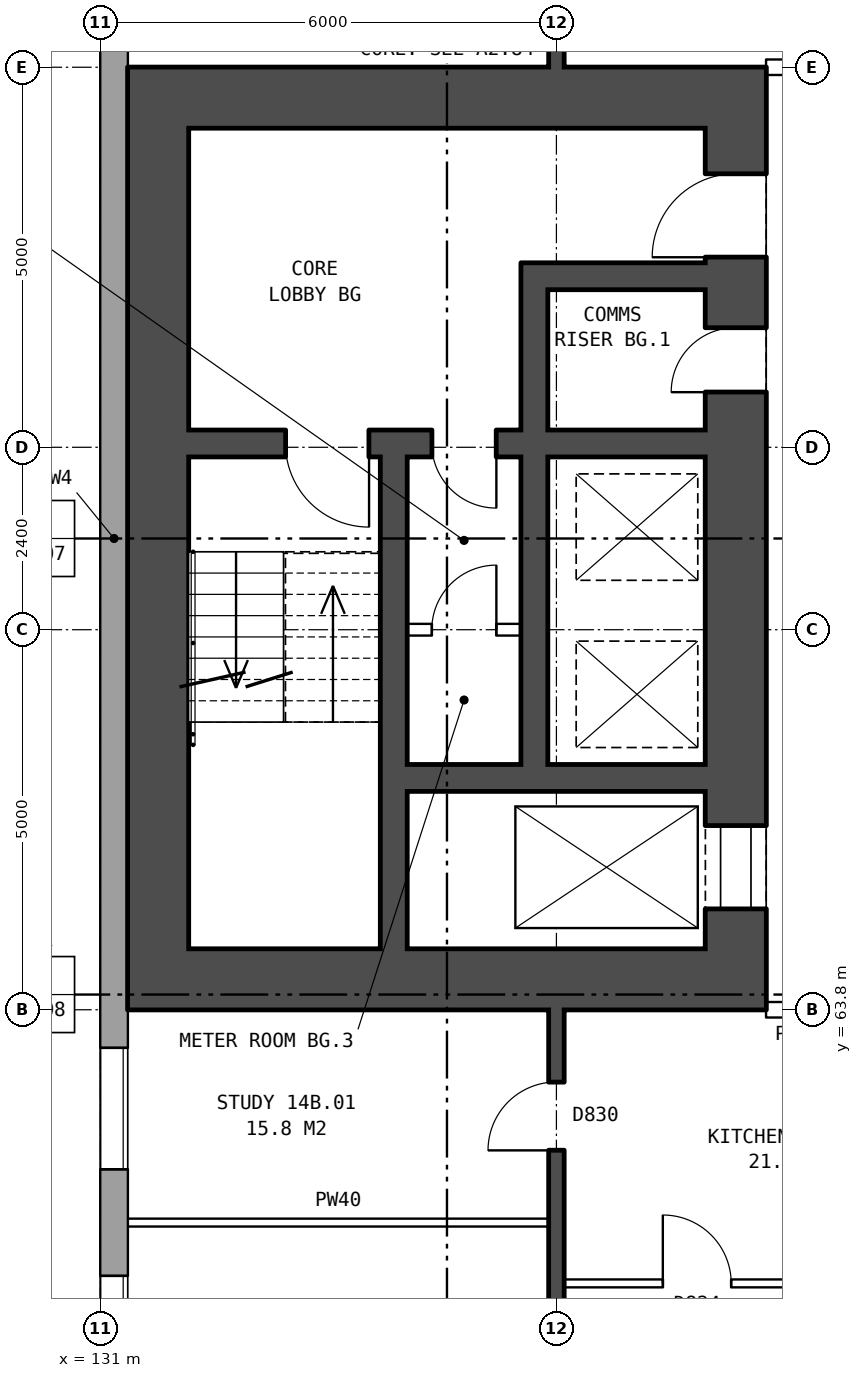
"""IFC4 building model, lengths in metres.
Left out: names, types, materials, properties, quantities, classifications, styles, units other than length and angle.
Written with IfcOpenShell. Run it as: python <this file> out.ifc"""

import sys

from ifc_helpers import new_model, si_unit, direction, frame, frame_2d, origin, place, context, subcontext, project, spatial, rectangle, extrude, element, fill, save


model = new_model("IFC4")
c1 = context("Model", 3, precision=1e-05, world=origin(), true_north=direction((0.0, 1.0)))
c2 = subcontext(c1, "Body", "Model", "MODEL_VIEW")
j1 = project(units=[si_unit("LENGTHUNIT", "METRE"), si_unit("PLANEANGLEUNIT", "RADIAN")], contexts=[c1])
p1 = place(None, origin())
s1 = spatial("IfcSite", under=j1, at=p1, CompositionType="ELEMENT")
p2 = place(p1, origin())
s2 = spatial("IfcBuilding", under=s1, at=p2, CompositionType="ELEMENT")
p3 = place(p2, frame((0.0, 0.0, 53.6)))
s3 = spatial("IfcBuildingStorey", under=s2, at=p3, CompositionType="ELEMENT", Elevation=53.6)
p4 = place(p3, frame((131.18, 82.925, 0.0), z_axis=(0.0, 0.0, 1.0), x_axis=(0.0, -1.0, 0.0)))
e1 = element("IfcWall", 1, at=p4, inside=s3, PredefinedType="STANDARD", context=c2, shape_type="SweptSolid", body=[
    extrude(rectangle(XDim=25.851, YDim=0.36, at=frame_2d((12.925, 0.0))), origin(), (0.0, 0.0, 1.0), 2.85),
])
p5 = place(p4, frame((1.625, 0.0, 0.8)))
e2 = element("IfcOpeningElement", 2, at=p5, cuts=e1, PredefinedType="OPENING", context=c2, shape_type="SweptSolid", body=[
    extrude(rectangle(XDim=1.6, YDim=1.8, at=frame_2d((0.8, 0.9))), frame((0.0, 0.19, 0.0), z_axis=(0.0, -1.0, 0.0), x_axis=(1.0, 0.0, 0.0)), (0.0, 0.0, 1.0), 0.38),
])
p6 = place(p4, frame((4.625, 0.0, 0.8)))
e3 = element("IfcOpeningElement", 3, at=p6, cuts=e1, PredefinedType="OPENING", context=c2, shape_type="SweptSolid", body=[
    extrude(rectangle(XDim=1.6, YDim=1.8, at=frame_2d((0.8, 0.9))), frame((0.0, 0.19, 0.0), z_axis=(0.0, -1.0, 0.0), x_axis=(1.0, 0.0, 0.0)), (0.0, 0.0, 1.0), 0.38),
])
p7 = place(p4, frame((19.625, 0.0, 0.8)))
e4 = element("IfcOpeningElement", 4, at=p7, cuts=e1, PredefinedType="OPENING", context=c2, shape_type="SweptSolid", body=[
    extrude(rectangle(XDim=1.6, YDim=1.8, at=frame_2d((0.8, 0.9))), frame((0.0, 0.19, 0.0), z_axis=(0.0, -1.0, 0.0), x_axis=(1.0, 0.0, 0.0)), (0.0, 0.0, 1.0), 0.38),
])
p8 = place(p4, frame((22.625, 0.0, 0.8)))
e5 = element("IfcOpeningElement", 5, at=p8, cuts=e1, PredefinedType="OPENING", context=c2, shape_type="SweptSolid", body=[
    extrude(rectangle(XDim=1.6, YDim=1.8, at=frame_2d((0.8, 0.9))), frame((0.0, 0.19, 0.0), z_axis=(0.0, -1.0, 0.0), x_axis=(1.0, 0.0, 0.0)), (0.0, 0.0, 1.0), 0.38),
])
p9 = place(p3, frame((139.36, 64.6, 0.0), z_axis=(0.0, 0.0, 1.0), x_axis=(0.0, 1.0, 0.0)))
e6 = element("IfcWall", 6, at=p9, inside=s3, PredefinedType="SHEAR", context=c2, shape_type="SweptSolid", body=[
    extrude(rectangle(XDim=10.8, YDim=0.8, at=frame_2d((5.4, 0.0))), origin(), (0.0, 0.0, 1.0), 2.85),
])
p10 = place(p9, frame((0.525, 0.0, 0.0)))
e7 = element("IfcOpeningElement", 7, at=p10, cuts=e6, PredefinedType="OPENING", context=c2, shape_type="SweptSolid", body=[
    extrude(rectangle(XDim=1.1, YDim=2.1, at=frame_2d((0.55, 1.05))), frame((0.0, 0.41, 0.0), z_axis=(0.0, -1.0, 0.0), x_axis=(1.0, 0.0, 0.0)), (0.0, 0.0, 1.0), 0.82),
])
p11 = place(p9, frame((9.1, 0.0, 0.0)))
e8 = element("IfcOpeningElement", 8, at=p11, cuts=e6, PredefinedType="OPENING", context=c2, shape_type="SweptSolid", body=[
    extrude(rectangle(XDim=1.1, YDim=2.1, at=frame_2d((0.55, 1.05))), frame((0.0, 0.41, 0.0), z_axis=(0.0, -1.0, 0.0), x_axis=(1.0, 0.0, 0.0)), (0.0, 0.0, 1.0), 0.82),
])
p12 = place(p9, frame((7.325, 0.0, 0.0)))
e9 = element("IfcOpeningElement", 9, at=p12, cuts=e6, PredefinedType="OPENING", context=c2, shape_type="SweptSolid", body=[
    extrude(rectangle(XDim=0.85, YDim=2.1, at=frame_2d((0.425, 1.05))), frame((0.0, 0.41, 0.0), z_axis=(0.0, -1.0, 0.0), x_axis=(1.0, 0.0, 0.0)), (0.0, 0.0, 1.0), 0.82),
])
p13 = place(p3, frame((131.76, 64.6, 0.0), z_axis=(0.0, 0.0, 1.0), x_axis=(0.0, 1.0, 0.0)))
e10 = element("IfcWall", 10, at=p13, inside=s3, PredefinedType="SHEAR", context=c2, shape_type="SweptSolid", body=[
    extrude(rectangle(XDim=10.8, YDim=0.8, at=frame_2d((5.4, 0.0))), origin(), (0.0, 0.0, 1.0), 2.85),
])
for number, where, z_axis, x_axis in (
    (11, (139.76, 64.2, 0.0), (0.0, 0.0, 1.0), (-1.0, 0.0, 0.0)),
    (12, (139.76, 75.8, 0.0), (0.0, 0.0, 1.0), (-1.0, 0.0, 0.0)),
):
    element("IfcWall", number, at=place(p3, frame(where, z_axis=z_axis, x_axis=x_axis)), inside=s3, PredefinedType="SHEAR", context=c2, shape_type="SweptSolid", body=[
        extrude(rectangle(XDim=8.4, YDim=0.8, at=frame_2d((4.2, 0.0))), origin(), (0.0, 0.0, 1.0), 2.85),
    ])
p14 = place(p3, frame((138.96, 66.85, 0.0), z_axis=(0.0, 0.0, 1.0), x_axis=(-1.0, 0.0, 0.0)))
e13 = element("IfcWall", 13, at=p14, inside=s3, PredefinedType="SHEAR", context=c2, shape_type="SweptSolid", body=[
    extrude(rectangle(XDim=3.925, YDim=0.35, at=frame_2d((1.962, 0.0))), origin(), (0.0, 0.0, 1.0), 2.85),
])
p15 = place(p3, frame((136.535, 68.8, 0.0), z_axis=(0.0, 0.0, 1.0), x_axis=(-1.0, 0.0, 0.0)))
e14 = element("IfcWall", 14, at=p15, inside=s3, PredefinedType="PARTITIONING", context=c2, shape_type="SweptSolid", body=[
    extrude(rectangle(XDim=1.5, YDim=0.15, at=frame_2d((0.75, 0.0))), origin(), (0.0, 0.0, 1.0), 2.85),
])
p16 = place(p15, frame((0.325, 0.0, 0.0)))
e15 = element("IfcOpeningElement", 15, at=p16, cuts=e14, PredefinedType="OPENING", context=c2, shape_type="SweptSolid", body=[
    extrude(rectangle(XDim=0.85, YDim=2.1, at=frame_2d((0.425, 1.05))), frame((0.0, 0.085, 0.0), z_axis=(0.0, -1.0, 0.0), x_axis=(1.0, 0.0, 0.0)), (0.0, 0.0, 1.0), 0.17),
])
p17 = place(p3, frame((138.96, 71.25, 0.0), z_axis=(0.0, 0.0, 1.0), x_axis=(-1.0, 0.0, 0.0)))
e16 = element("IfcWall", 16, at=p17, inside=s3, PredefinedType="SHEAR", context=c2, shape_type="SweptSolid", body=[
    extrude(rectangle(XDim=6.8, YDim=0.35, at=frame_2d((3.4, 0.0))), origin(), (0.0, 0.0, 1.0), 2.85),
])
p18 = place(p17, frame((4.425, 0.0, 0.0)))
e17 = element("IfcOpeningElement", 17, at=p18, cuts=e16, PredefinedType="OPENING", context=c2, shape_type="SweptSolid", body=[
    extrude(rectangle(XDim=1.1, YDim=2.1, at=frame_2d((0.55, 1.05))), frame((0.0, 0.185, 0.0), z_axis=(0.0, -1.0, 0.0), x_axis=(1.0, 0.0, 0.0)), (0.0, 0.0, 1.0), 0.37),
])
p19 = place(p17, frame((2.75, 0.0, 0.0)))
e18 = element("IfcOpeningElement", 18, at=p19, cuts=e16, PredefinedType="OPENING", context=c2, shape_type="SweptSolid", body=[
    extrude(rectangle(XDim=0.85, YDim=2.1, at=frame_2d((0.425, 1.05))), frame((0.0, 0.185, 0.0), z_axis=(0.0, -1.0, 0.0), x_axis=(1.0, 0.0, 0.0)), (0.0, 0.0, 1.0), 0.37),
])
p20 = place(p3, frame((138.96, 73.45, 0.0), z_axis=(0.0, 0.0, 1.0), x_axis=(-1.0, 0.0, 0.0)))
e19 = element("IfcWall", 19, at=p20, inside=s3, PredefinedType="SHEAR", context=c2, shape_type="SweptSolid", body=[
    extrude(rectangle(XDim=2.075, YDim=0.35, at=frame_2d((1.038, 0.0))), origin(), (0.0, 0.0, 1.0), 2.85),
])
p21 = place(p3, frame((136.71, 67.025, 0.0), z_axis=(0.0, 0.0, 1.0), x_axis=(0.0, 1.0, 0.0)))
e20 = element("IfcWall", 20, at=p21, inside=s3, PredefinedType="SHEAR", context=c2, shape_type="SweptSolid", body=[
    extrude(rectangle(XDim=4.05, YDim=0.35, at=frame_2d((2.025, 0.0))), origin(), (0.0, 0.0, 1.0), 2.85),
])
p22 = place(p3, frame((136.71, 71.425, 0.0), z_axis=(0.0, 0.0, 1.0), x_axis=(0.0, 1.0, 0.0)))
e21 = element("IfcWall", 21, at=p22, inside=s3, PredefinedType="SHEAR", context=c2, shape_type="SweptSolid", body=[
    extrude(rectangle(XDim=2.2, YDim=0.35, at=frame_2d((1.1, 0.0))), origin(), (0.0, 0.0, 1.0), 2.85),
])
p23 = place(p3, frame((134.86, 64.6, 0.0), z_axis=(0.0, 0.0, 1.0), x_axis=(0.0, 1.0, 0.0)))
e22 = element("IfcWall", 22, at=p23, inside=s3, PredefinedType="SHEAR", context=c2, shape_type="SweptSolid", body=[
    extrude(rectangle(XDim=6.475, YDim=0.35, at=frame_2d((3.237, 0.0))), origin(), (0.0, 0.0, 1.0), 2.85),
])
p24 = place(p3, frame((137.1, 60.2, 0.0), z_axis=(0.0, 0.0, 1.0), x_axis=(1.0, 0.0, 0.0)))
e23 = element("IfcWall", 23, at=p24, inside=s3, PredefinedType="PARTITIONING", context=c2, shape_type="SweptSolid", body=[
    extrude(rectangle(XDim=5.8, YDim=0.1, at=frame_2d((2.9, 0.0))), origin(), (0.0, 0.0, 1.0), 2.85),
])
p25 = place(p24, frame((1.3, 0.0, 0.0)))
e24 = element("IfcOpeningElement", 24, at=p25, cuts=e23, PredefinedType="OPENING", context=c2, shape_type="SweptSolid", body=[
    extrude(rectangle(XDim=0.9, YDim=2.1, at=frame_2d((0.45, 1.05))), frame((0.0, 0.06, 0.0), z_axis=(0.0, -1.0, 0.0), x_axis=(1.0, 0.0, 0.0)), (0.0, 0.0, 1.0), 0.12),
])
p26 = place(p24, frame((4.2, 0.0, 0.0)))
e25 = element("IfcOpeningElement", 25, at=p26, cuts=e23, PredefinedType="OPENING", context=c2, shape_type="SweptSolid", body=[
    extrude(rectangle(XDim=0.9, YDim=2.1, at=frame_2d((0.45, 1.05))), frame((0.0, 0.06, 0.0), z_axis=(0.0, -1.0, 0.0), x_axis=(1.0, 0.0, 0.0)), (0.0, 0.0, 1.0), 0.12),
])
p27 = place(p3, frame((131.36, 61.0, 0.0), z_axis=(0.0, 0.0, 1.0), x_axis=(1.0, 0.0, 0.0)))
e26 = element("IfcWall", 26, at=p27, inside=s3, PredefinedType="PARTITIONING", context=c2, shape_type="SweptSolid", body=[
    extrude(rectangle(XDim=5.54, YDim=0.1, at=frame_2d((2.77, 0.0))), origin(), (0.0, 0.0, 1.0), 2.85),
])
p28 = place(p3, frame((139.76, 63.8, 0.0), z_axis=(0.0, 0.0, 1.0), x_axis=(1.0, 0.0, 0.0)))
e27 = element("IfcWall", 27, at=p28, inside=s3, PredefinedType="PARTITIONING", context=c2, shape_type="SweptSolid", body=[
    extrude(rectangle(XDim=3.0, YDim=0.2, at=frame_2d((1.5, 0.0))), origin(), (0.0, 0.0, 1.0), 2.85),
])
p29 = place(p28, frame((1.0, 0.0, 0.0)))
e28 = element("IfcOpeningElement", 28, at=p29, cuts=e27, PredefinedType="OPENING", context=c2, shape_type="SweptSolid", body=[
    extrude(rectangle(XDim=1.0, YDim=2.1, at=frame_2d((0.5, 1.05))), frame((0.0, 0.11, 0.0), z_axis=(0.0, -1.0, 0.0), x_axis=(1.0, 0.0, 0.0)), (0.0, 0.0, 1.0), 0.22),
])
p30 = place(p3, frame((139.76, 76.2, 0.0), z_axis=(0.0, 0.0, 1.0), x_axis=(1.0, 0.0, 0.0)))
e29 = element("IfcWall", 29, at=p30, inside=s3, PredefinedType="PARTITIONING", context=c2, shape_type="SweptSolid", body=[
    extrude(rectangle(XDim=3.0, YDim=0.2, at=frame_2d((1.5, 0.0))), origin(), (0.0, 0.0, 1.0), 2.85),
])
p31 = place(p30, frame((1.0, 0.0, 0.0)))
e30 = element("IfcOpeningElement", 30, at=p31, cuts=e29, PredefinedType="OPENING", context=c2, shape_type="SweptSolid", body=[
    extrude(rectangle(XDim=1.0, YDim=2.1, at=frame_2d((0.5, 1.05))), frame((0.0, 0.11, 0.0), z_axis=(0.0, -1.0, 0.0), x_axis=(1.0, 0.0, 0.0)), (0.0, 0.0, 1.0), 0.22),
])
p32 = place(p3, frame((137.0, 54.36, 0.0), z_axis=(0.0, 0.0, 1.0), x_axis=(0.0, 1.0, 0.0)))
e31 = element("IfcWall", 31, at=p32, inside=s3, PredefinedType="SOLIDWALL", context=c2, shape_type="SweptSolid", body=[
    extrude(rectangle(XDim=9.44, YDim=0.2, at=frame_2d((4.72, 0.0))), origin(), (0.0, 0.0, 1.0), 2.85),
])
p33 = place(p32, frame((2.47, 0.0, 0.0)))
e32 = element("IfcOpeningElement", 32, at=p33, cuts=e31, PredefinedType="OPENING", context=c2, shape_type="SweptSolid", body=[
    extrude(rectangle(XDim=0.9, YDim=2.1, at=frame_2d((0.45, 1.05))), frame((0.0, 0.11, 0.0), z_axis=(0.0, -1.0, 0.0), x_axis=(1.0, 0.0, 0.0)), (0.0, 0.0, 1.0), 0.22),
])
p34 = place(p32, frame((7.59, 0.0, 0.0)))
e33 = element("IfcOpeningElement", 33, at=p34, cuts=e31, PredefinedType="OPENING", context=c2, shape_type="SweptSolid", body=[
    extrude(rectangle(XDim=0.9, YDim=2.1, at=frame_2d((0.45, 1.05))), frame((0.0, 0.11, 0.0), z_axis=(0.0, -1.0, 0.0), x_axis=(1.0, 0.0, 0.0)), (0.0, 0.0, 1.0), 0.22),
])
p35 = place(p3, frame((137.0, 76.2, 0.0), z_axis=(0.0, 0.0, 1.0), x_axis=(0.0, 1.0, 0.0)))
e34 = element("IfcWall", 34, at=p35, inside=s3, PredefinedType="SOLIDWALL", context=c2, shape_type="SweptSolid", body=[
    extrude(rectangle(XDim=9.44, YDim=0.2, at=frame_2d((4.72, 0.0))), origin(), (0.0, 0.0, 1.0), 2.85),
])
p36 = place(p35, frame((1.5, 0.0, 0.0)))
e35 = element("IfcOpeningElement", 35, at=p36, cuts=e34, PredefinedType="OPENING", context=c2, shape_type="SweptSolid", body=[
    extrude(rectangle(XDim=0.9, YDim=2.1, at=frame_2d((0.45, 1.05))), frame((0.0, 0.11, 0.0), z_axis=(0.0, -1.0, 0.0), x_axis=(1.0, 0.0, 0.0)), (0.0, 0.0, 1.0), 0.22),
])
p37 = place(p7, origin())
e36 = element("IfcWindow", 36, at=p37, inside=s3, PartitioningType="SINGLE_PANEL", PredefinedType="WINDOW", context=c2, shape_type="SweptSolid", body=[
    extrude(rectangle(XDim=1.6, YDim=1.8, at=frame_2d((0.8, 0.9))), frame((0.0, 0.15, 0.0), z_axis=(0.0, -1.0, 0.0), x_axis=(1.0, 0.0, 0.0)), (0.0, 0.0, 1.0), 0.06),
])
fill(e4, e36)
p38 = place(p8, origin())
e37 = element("IfcWindow", 37, at=p38, inside=s3, PartitioningType="SINGLE_PANEL", PredefinedType="WINDOW", context=c2, shape_type="SweptSolid", body=[
    extrude(rectangle(XDim=1.6, YDim=1.8, at=frame_2d((0.8, 0.9))), frame((0.0, 0.15, 0.0), z_axis=(0.0, -1.0, 0.0), x_axis=(1.0, 0.0, 0.0)), (0.0, 0.0, 1.0), 0.06),
])
fill(e5, e37)
p39 = place(p10, origin())
e38 = element("IfcDoor", 38, at=p39, inside=s3, OperationType="DOUBLE_DOOR_SLIDING", PredefinedType="DOOR", context=c2, shape_type="SweptSolid", body=[
    extrude(rectangle(XDim=1.1, YDim=2.1, at=frame_2d((0.55, 1.05))), frame((0.0, 0.385, 0.0), z_axis=(0.0, -1.0, 0.0), x_axis=(1.0, 0.0, 0.0)), (0.0, 0.0, 1.0), 0.05),
])
fill(e7, e38)
p40 = place(p11, origin())
e39 = element("IfcDoor", 39, at=p40, inside=s3, OperationType="SINGLE_SWING_LEFT", PredefinedType="DOOR", context=c2, shape_type="SweptSolid", body=[
    extrude(rectangle(XDim=1.1, YDim=2.1, at=frame_2d((0.55, 1.05))), frame((0.0, 0.385, 0.0), z_axis=(0.0, -1.0, 0.0), x_axis=(1.0, 0.0, 0.0)), (0.0, 0.0, 1.0), 0.05),
])
fill(e8, e39)
p41 = place(p18, origin())
e40 = element("IfcDoor", 40, at=p41, inside=s3, OperationType="SINGLE_SWING_LEFT", PredefinedType="DOOR", context=c2, shape_type="SweptSolid", body=[
    extrude(rectangle(XDim=1.1, YDim=2.1, at=frame_2d((0.55, 1.05))), frame((0.0, 0.025, 0.0), z_axis=(0.0, -1.0, 0.0), x_axis=(1.0, 0.0, 0.0)), (0.0, 0.0, 1.0), 0.05),
])
fill(e17, e40)
p42 = place(p12, origin())
e41 = element("IfcDoor", 41, at=p42, inside=s3, OperationType="SINGLE_SWING_LEFT", PredefinedType="DOOR", context=c2, shape_type="SweptSolid", body=[
    extrude(rectangle(XDim=0.85, YDim=2.1, at=frame_2d((0.425, 1.05))), frame((0.0, 0.385, 0.0), z_axis=(0.0, -1.0, 0.0), x_axis=(1.0, 0.0, 0.0)), (0.0, 0.0, 1.0), 0.05),
])
fill(e9, e41)
p43 = place(p19, origin())
e42 = element("IfcDoor", 42, at=p43, inside=s3, OperationType="SINGLE_SWING_LEFT", PredefinedType="DOOR", context=c2, shape_type="SweptSolid", body=[
    extrude(rectangle(XDim=0.85, YDim=2.1, at=frame_2d((0.425, 1.05))), frame((0.0, 0.025, 0.0), z_axis=(0.0, -1.0, 0.0), x_axis=(1.0, 0.0, 0.0)), (0.0, 0.0, 1.0), 0.05),
])
fill(e18, e42)
p44 = place(p16, frame((0.85, 0.0, 0.0), z_axis=(0.0, 0.0, 1.0), x_axis=(-1.0, 0.0, 0.0)))
e43 = element("IfcDoor", 43, at=p44, inside=s3, OperationType="SINGLE_SWING_RIGHT", PredefinedType="DOOR", context=c2, shape_type="SweptSolid", body=[
    extrude(rectangle(XDim=0.85, YDim=2.1, at=frame_2d((0.425, 1.05))), frame((0.0, 0.025, 0.0), z_axis=(0.0, -1.0, 0.0), x_axis=(1.0, 0.0, 0.0)), (0.0, 0.0, 1.0), 0.05),
])
fill(e15, e43)
p45 = place(p34, origin())
e44 = element("IfcDoor", 44, at=p45, inside=s3, OperationType="SINGLE_SWING_LEFT", PredefinedType="DOOR", context=c2, shape_type="SweptSolid", body=[
    extrude(rectangle(XDim=0.9, YDim=2.1, at=frame_2d((0.45, 1.05))), frame((0.0, 0.025, 0.0), z_axis=(0.0, -1.0, 0.0), x_axis=(1.0, 0.0, 0.0)), (0.0, 0.0, 1.0), 0.05),
])
fill(e33, e44)
p46 = place(p25, origin())
e45 = element("IfcDoor", 45, at=p46, inside=s3, OperationType="SINGLE_SWING_LEFT", PredefinedType="DOOR", context=c2, shape_type="SweptSolid", body=[
    extrude(rectangle(XDim=0.9, YDim=2.1, at=frame_2d((0.45, 1.05))), frame((0.0, 0.025, 0.0), z_axis=(0.0, -1.0, 0.0), x_axis=(1.0, 0.0, 0.0)), (0.0, 0.0, 1.0), 0.05),
])
fill(e24, e45)
save(model, sys.argv[1])
